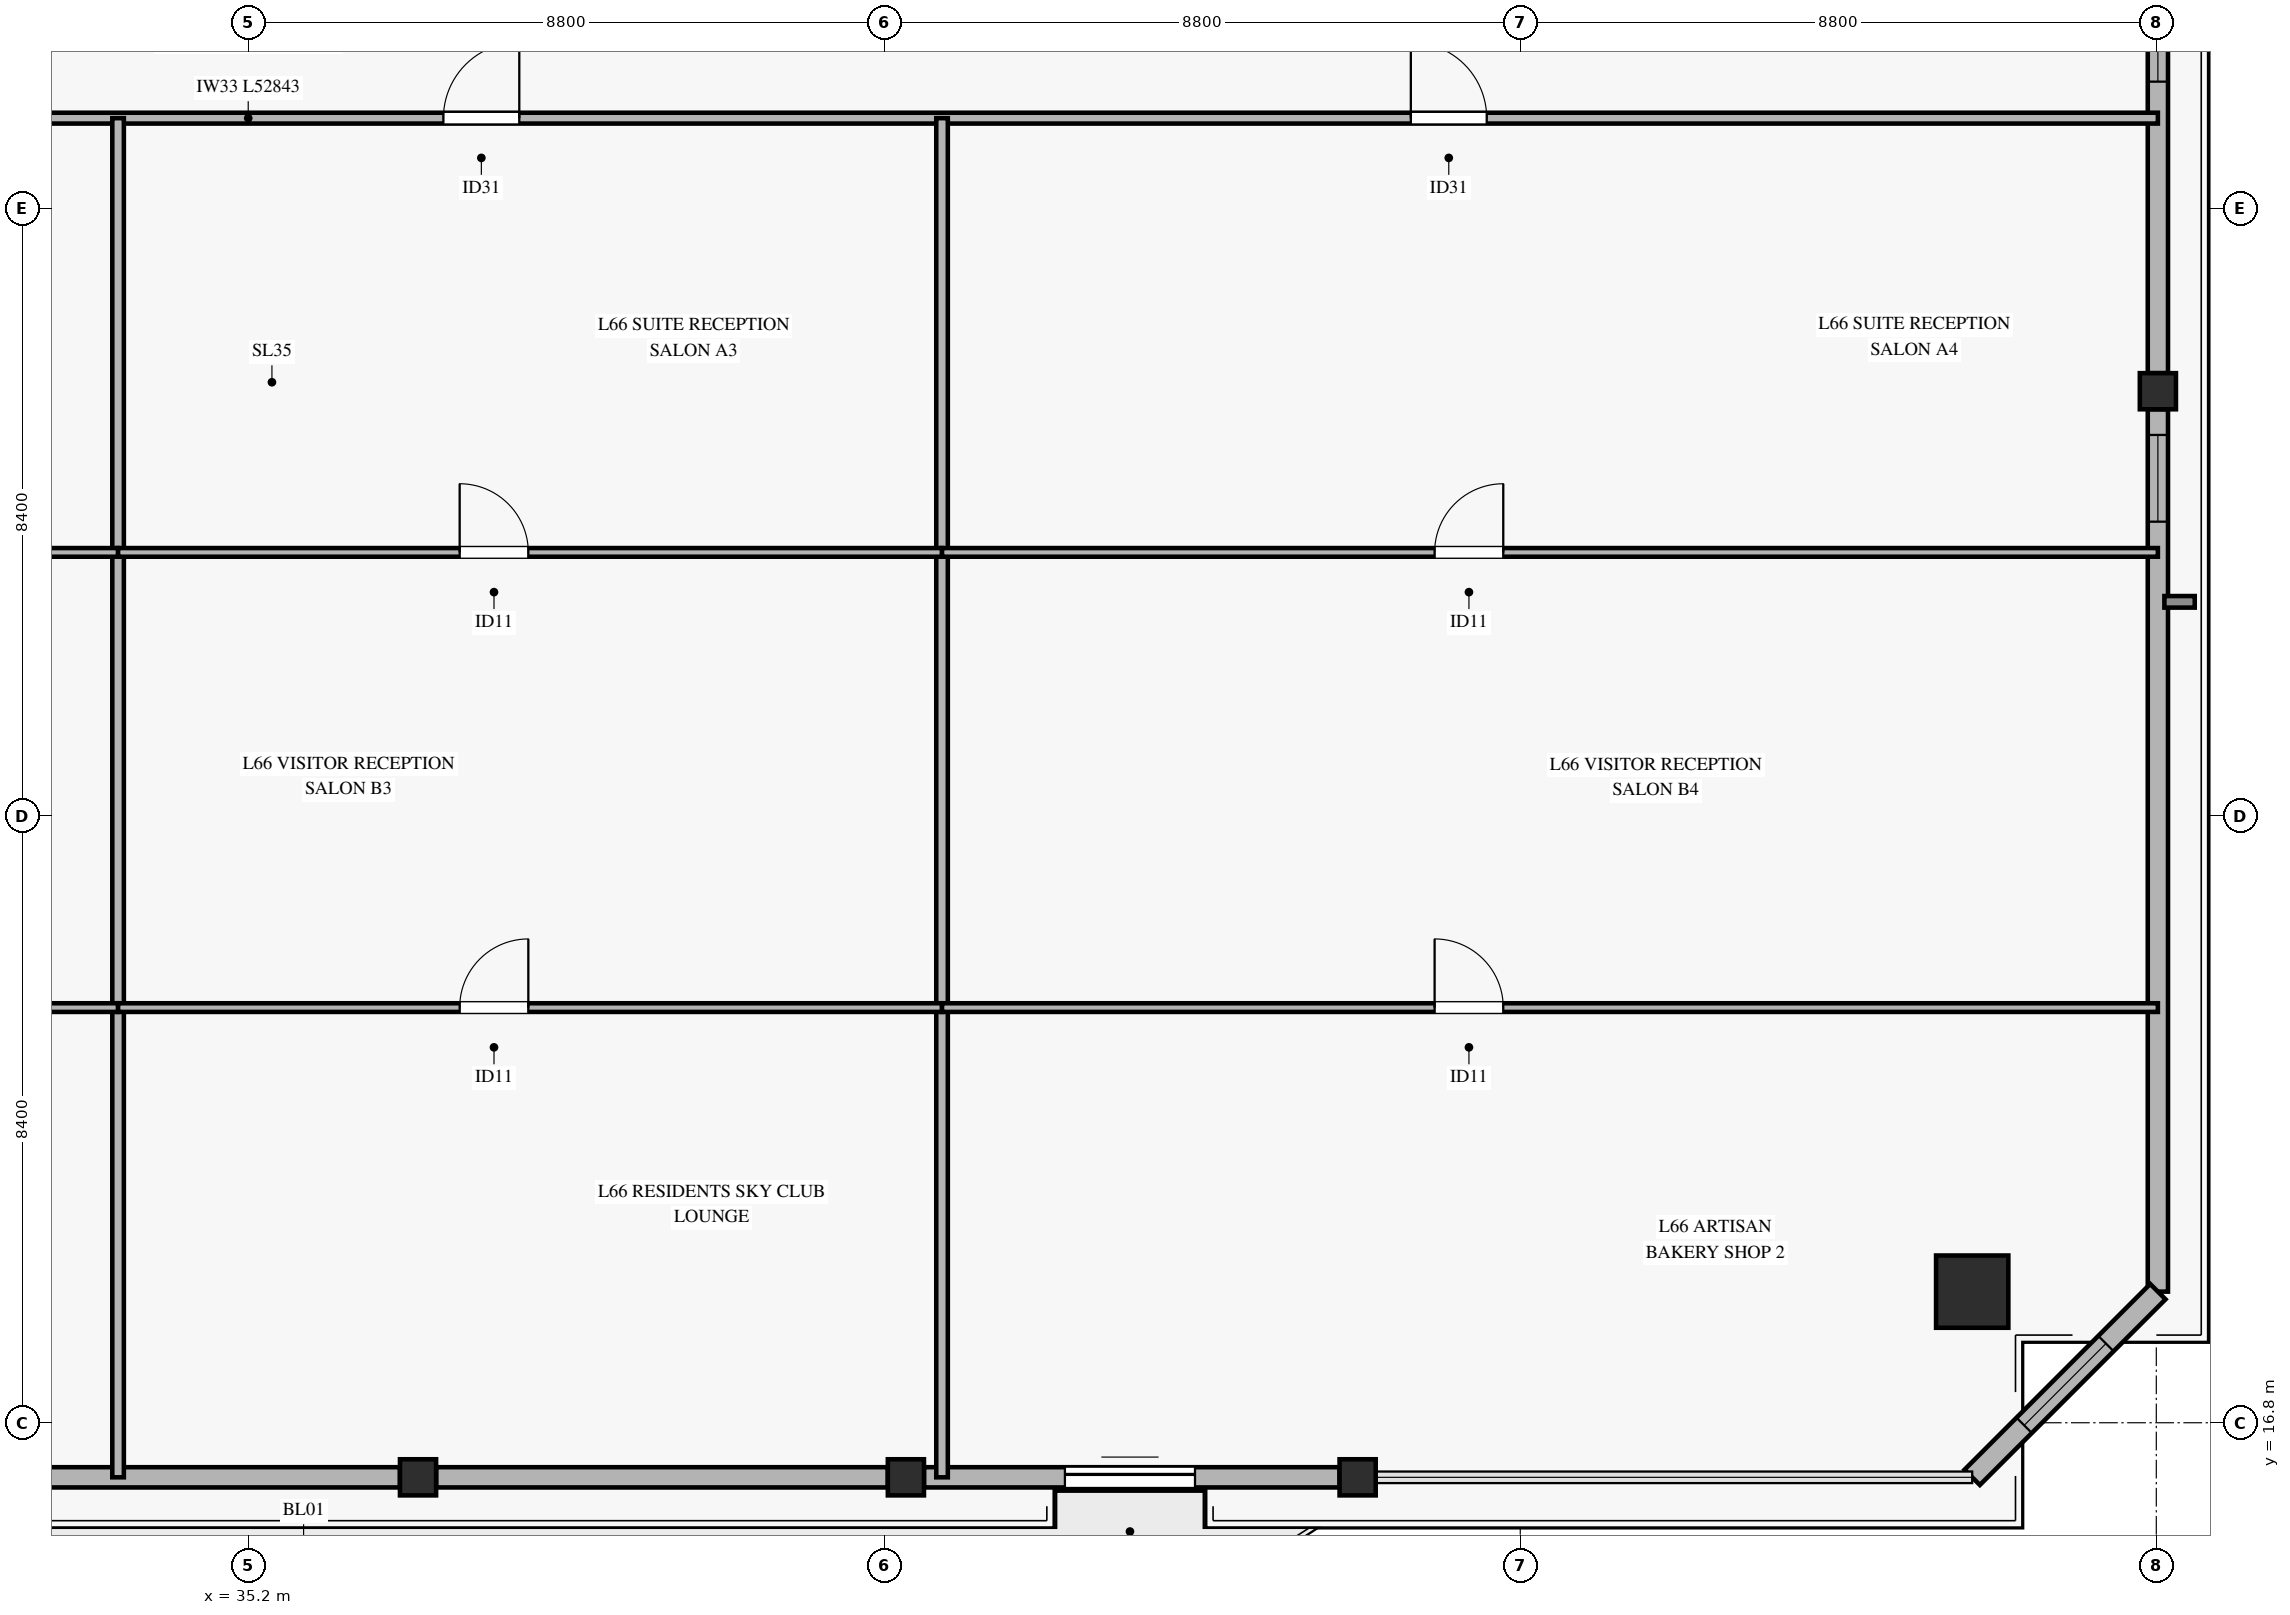
"""IFC4 building model, lengths in metres.
Left out: names, types, materials, properties, quantities, classifications, styles, units other than length and angle.
Written with IfcOpenShell. Run it as: python <this file> out.ifc"""

import sys

from ifc_helpers import new_model, si_unit, direction, frame, frame_2d, origin, origin_2d, place, context, subcontext, project, spatial, rectangle, hollow_rectangle, extrude, source, transform, mapped, element, fill, save


model = new_model("IFC4")
c1 = context("Model", 3, precision=1e-05, world=origin(), true_north=direction((0.0, 1.0)))
c2 = subcontext(c1, "Body", "Model", "MODEL_VIEW")
j1 = project(units=[si_unit("LENGTHUNIT", "METRE"), si_unit("PLANEANGLEUNIT", "RADIAN")], contexts=[c1])
p1 = place(None, origin())
s1 = spatial("IfcSite", under=j1, at=p1, CompositionType="ELEMENT")
p2 = place(p1, origin())
s2 = spatial("IfcBuilding", under=s1, at=p2, CompositionType="ELEMENT")
p3 = place(p2, frame((0.0, 0.0, 258.7)))
s3 = spatial("IfcBuildingStorey", under=s2, at=p3, CompositionType="ELEMENT", Elevation=258.7)
m1 = source(origin(), c2, "Body", "SweptSolid", [
    extrude(hollow_rectangle(XDim=1.0, YDim=1.0, WallThickness=0.045, at=origin_2d()), origin(), (0.0, 0.0, 1.0), 3.185),
])
p4 = place(p3, frame((59.053, 18.614, 0.0), z_axis=(0.0, 0.0, 1.0), x_axis=(1.0, 0.0, 0.0)))
e1 = element("IfcColumn", 1, at=p4, inside=s3, PredefinedType="COLUMN", context=c2, shape_type="MappedRepresentation", body=[
    mapped(m1, transform((0.0, 0.0, 0.0), x_axis=(1.0, 0.0, 0.0), y_axis=(0.0, 1.0, 0.0), z_axis=(0.0, 0.0, 1.0), scale=1.0)),
])
m2 = source(origin(), c2, "Body", "SweptSolid", [
    extrude(hollow_rectangle(XDim=0.5, YDim=0.5, WallThickness=0.024, at=origin_2d()), origin(), (0.0, 0.0, 1.0), 3.185),
])
for number, where, z_axis, x_axis in (
    (2, (37.55, 16.045, 0.0), (0.0, 0.0, 1.0), (1.0, 0.0, 0.0)),
    (3, (44.3, 16.045, 0.0), (0.0, 0.0, 1.0), (1.0, 0.0, 0.0)),
    (4, (50.55, 16.045, 0.0), (0.0, 0.0, 1.0), (1.0, 0.0, 0.0)),
    (5, (61.622, 31.072, 0.0), (0.0, 0.0, 1.0), (1.0, 0.0, 0.0)),
):
    element("IfcColumn", number, at=place(p3, frame(where, z_axis=z_axis, x_axis=x_axis)), inside=s3, PredefinedType="COLUMN", context=c2, shape_type="MappedRepresentation", body=[
        mapped(m2, transform((0.0, 0.0, 0.0), x_axis=(1.0, 0.0, 0.0), y_axis=(0.0, 1.0, 0.0), z_axis=(0.0, 0.0, 1.0), scale=1.0)),
    ])
for number, where, z_axis, x_axis in (
    (6, (31.05, 16.045, 0.0), (0.0, 0.0, 1.0), (1.0, 0.0, 0.0)),
    (7, (37.8, 16.045, 0.0), (0.0, 0.0, 1.0), (1.0, 0.0, 0.0)),
):
    element("IfcWall", number, at=place(p3, frame(where, z_axis=z_axis, x_axis=x_axis)), inside=s3, PredefinedType="SOLIDWALL", context=c2, shape_type="SweptSolid", body=[
        extrude(rectangle(XDim=6.25, YDim=0.28, at=frame_2d((3.125, 0.0))), origin(), (0.0, 0.0, 1.0), 2.815),
    ])
p5 = place(p3, frame((44.55, 16.045, 0.0), z_axis=(0.0, 0.0, 1.0), x_axis=(1.0, 0.0, 0.0)))
e8 = element("IfcWall", 8, at=p5, inside=s3, PredefinedType="SOLIDWALL", context=c2, shape_type="SweptSolid", body=[
    extrude(rectangle(XDim=5.75, YDim=0.28, at=frame_2d((2.875, 0.0))), origin(), (0.0, 0.0, 1.0), 2.815),
])
p6 = place(p5, frame((1.95, 0.0, 0.0)))
e9 = element("IfcOpeningElement", 9, at=p6, cuts=e8, PredefinedType="OPENING", context=c2, shape_type="SweptSolid", body=[
    extrude(rectangle(XDim=1.8, YDim=2.25, at=frame_2d((0.9, 1.125))), frame((0.0, 0.15, 0.0), z_axis=(0.0, -1.0, 0.0), x_axis=(1.0, 0.0, 0.0)), (0.0, 0.0, 1.0), 0.3),
])
p7 = place(p3, frame((61.622, 18.614, 0.0), z_axis=(0.0, 0.0, 1.0), x_axis=(0.0, 1.0, 0.0)))
e10 = element("IfcWall", 10, at=p7, inside=s3, PredefinedType="SOLIDWALL", context=c2, shape_type="SweptSolid", body=[
    extrude(rectangle(XDim=12.208, YDim=0.28, at=frame_2d((6.104, 0.0))), origin(), (0.0, 0.0, 1.0), 2.815),
])
p8 = place(p7, frame((10.653, 0.0, 0.45)))
e11 = element("IfcOpeningElement", 11, at=p8, cuts=e10, PredefinedType="OPENING", context=c2, shape_type="SweptSolid", body=[
    extrude(rectangle(XDim=1.2, YDim=2.0, at=frame_2d((0.6, 1.0))), frame((0.0, 0.15, 0.0), z_axis=(0.0, -1.0, 0.0), x_axis=(1.0, 0.0, 0.0)), (0.0, 0.0, 1.0), 0.3),
])
p9 = place(p3, frame((61.622, 31.322, 0.0), z_axis=(0.0, 0.0, 1.0), x_axis=(0.0, 1.0, 0.0)))
e12 = element("IfcWall", 12, at=p9, inside=s3, PredefinedType="SOLIDWALL", context=c2, shape_type="SweptSolid", body=[
    extrude(rectangle(XDim=12.208, YDim=0.28, at=frame_2d((6.104, 0.0))), origin(), (0.0, 0.0, 1.0), 2.815),
])
p10 = place(p9, frame((4.033, 0.0, 0.45)))
e13 = element("IfcOpeningElement", 13, at=p10, cuts=e12, PredefinedType="OPENING", context=c2, shape_type="SweptSolid", body=[
    extrude(rectangle(XDim=1.6, YDim=2.0, at=frame_2d((0.8, 1.0))), frame((0.0, 0.15, 0.0), z_axis=(0.0, -1.0, 0.0), x_axis=(1.0, 0.0, 0.0)), (0.0, 0.0, 1.0), 0.3),
])
p11 = place(p3, frame((59.053, 16.045, 0.0), z_axis=(0.0, 0.0, 1.0), x_axis=(0.707106781187, 0.707106781187, 0.0)))
e14 = element("IfcWall", 14, at=p11, inside=s3, PredefinedType="SOLIDWALL", context=c2, shape_type="SweptSolid", body=[
    extrude(rectangle(XDim=3.633, YDim=0.3, at=frame_2d((1.817, 0.0))), origin(), (0.0, 0.0, 1.0), 2.815),
])
p12 = place(p11, frame((1.017, 0.0, 0.45)))
e15 = element("IfcOpeningElement", 15, at=p12, cuts=e14, PredefinedType="OPENING", context=c2, shape_type="SweptSolid", body=[
    extrude(rectangle(XDim=1.6, YDim=2.0, at=frame_2d((0.8, 1.0))), frame((0.0, 0.16, 0.0), z_axis=(0.0, -1.0, 0.0), x_axis=(1.0, 0.0, 0.0)), (0.0, 0.0, 1.0), 0.32),
])
p13 = place(p3, frame((8.779, 34.85, 0.0), z_axis=(0.0, 0.0, 1.0), x_axis=(1.0, 0.0, 0.0)))
e16 = element("IfcWall", 16, at=p13, inside=s3, PredefinedType="PARTITIONING", context=c2, shape_type="SweptSolid", body=[
    extrude(rectangle(XDim=52.843, YDim=0.15, at=frame_2d((26.421, 0.0))), origin(), (0.0, 0.0, 1.0), 2.47),
])
p14 = place(p13, frame((4.937, 0.0, 0.0)))
e17 = element("IfcOpeningElement", 17, at=p14, cuts=e16, PredefinedType="OPENING", context=c2, shape_type="SweptSolid", body=[
    extrude(rectangle(XDim=1.05, YDim=2.15, at=frame_2d((0.525, 1.075))), frame((0.0, 0.085, 0.0), z_axis=(0.0, -1.0, 0.0), x_axis=(1.0, 0.0, 0.0)), (0.0, 0.0, 1.0), 0.17),
])
p15 = place(p13, frame((17.102, 0.0, 0.0)))
e18 = element("IfcOpeningElement", 18, at=p15, cuts=e16, PredefinedType="OPENING", context=c2, shape_type="SweptSolid", body=[
    extrude(rectangle(XDim=1.05, YDim=2.15, at=frame_2d((0.525, 1.075))), frame((0.0, 0.085, 0.0), z_axis=(0.0, -1.0, 0.0), x_axis=(1.0, 0.0, 0.0)), (0.0, 0.0, 1.0), 0.17),
])
p16 = place(p13, frame((29.122, 0.0, 0.0)))
e19 = element("IfcOpeningElement", 19, at=p16, cuts=e16, PredefinedType="OPENING", context=c2, shape_type="SweptSolid", body=[
    extrude(rectangle(XDim=1.05, YDim=2.15, at=frame_2d((0.525, 1.075))), frame((0.0, 0.085, 0.0), z_axis=(0.0, -1.0, 0.0), x_axis=(1.0, 0.0, 0.0)), (0.0, 0.0, 1.0), 0.17),
])
p17 = place(p13, frame((42.507, 0.0, 0.0)))
e20 = element("IfcOpeningElement", 20, at=p17, cuts=e16, PredefinedType="OPENING", context=c2, shape_type="SweptSolid", body=[
    extrude(rectangle(XDim=1.05, YDim=2.15, at=frame_2d((0.525, 1.075))), frame((0.0, 0.085, 0.0), z_axis=(0.0, -1.0, 0.0), x_axis=(1.0, 0.0, 0.0)), (0.0, 0.0, 1.0), 0.17),
])
for number, where, z_axis, x_axis in (
    (21, (33.4, 16.045, 0.0), (0.0, 0.0, 1.0), (0.0, 1.0, 0.0)),
    (22, (44.8, 16.045, 0.0), (0.0, 0.0, 1.0), (0.0, 1.0, 0.0)),
):
    element("IfcWall", number, at=place(p3, frame(where, z_axis=z_axis, x_axis=x_axis)), inside=s3, PredefinedType="PARTITIONING", context=c2, shape_type="SweptSolid", body=[
        extrude(rectangle(XDim=18.805, YDim=0.16, at=frame_2d((9.403, 0.0))), origin(), (0.0, 0.0, 1.0), 2.77),
    ])
p18 = place(p3, frame((21.0, 22.544, 0.0), z_axis=(0.0, 0.0, 1.0), x_axis=(1.0, 0.0, 0.0)))
e23 = element("IfcWall", 23, at=p18, inside=s3, PredefinedType="PARTITIONING", context=c2, shape_type="SweptSolid", body=[
    extrude(rectangle(XDim=12.4, YDim=0.12, at=frame_2d((6.2, 0.0))), origin(), (0.0, 0.0, 1.0), 2.47),
])
p19 = place(p18, frame((5.126, 0.0, 0.0)))
e24 = element("IfcOpeningElement", 24, at=p19, cuts=e23, PredefinedType="OPENING", context=c2, shape_type="SweptSolid", body=[
    extrude(rectangle(XDim=0.95, YDim=2.1, at=frame_2d((0.475, 1.05))), frame((0.0, 0.07, 0.0), z_axis=(0.0, -1.0, 0.0), x_axis=(1.0, 0.0, 0.0)), (0.0, 0.0, 1.0), 0.14),
])
p20 = place(p3, frame((21.0, 28.842, 0.0), z_axis=(0.0, 0.0, 1.0), x_axis=(1.0, 0.0, 0.0)))
e25 = element("IfcWall", 25, at=p20, inside=s3, PredefinedType="PARTITIONING", context=c2, shape_type="SweptSolid", body=[
    extrude(rectangle(XDim=12.4, YDim=0.12, at=frame_2d((6.2, 0.0))), origin(), (0.0, 0.0, 1.0), 2.47),
])
p21 = place(p20, frame((5.126, 0.0, 0.0)))
e26 = element("IfcOpeningElement", 26, at=p21, cuts=e25, PredefinedType="OPENING", context=c2, shape_type="SweptSolid", body=[
    extrude(rectangle(XDim=0.95, YDim=2.1, at=frame_2d((0.475, 1.05))), frame((0.0, 0.07, 0.0), z_axis=(0.0, -1.0, 0.0), x_axis=(1.0, 0.0, 0.0)), (0.0, 0.0, 1.0), 0.14),
])
p22 = place(p3, frame((33.4, 22.544, 0.0), z_axis=(0.0, 0.0, 1.0), x_axis=(1.0, 0.0, 0.0)))
e27 = element("IfcWall", 27, at=p22, inside=s3, PredefinedType="PARTITIONING", context=c2, shape_type="SweptSolid", body=[
    extrude(rectangle(XDim=11.4, YDim=0.12, at=frame_2d((5.7, 0.0))), origin(), (0.0, 0.0, 1.0), 2.47),
])
p23 = place(p22, frame((4.726, 0.0, 0.0)))
e28 = element("IfcOpeningElement", 28, at=p23, cuts=e27, PredefinedType="OPENING", context=c2, shape_type="SweptSolid", body=[
    extrude(rectangle(XDim=0.95, YDim=2.1, at=frame_2d((0.475, 1.05))), frame((0.0, 0.07, 0.0), z_axis=(0.0, -1.0, 0.0), x_axis=(1.0, 0.0, 0.0)), (0.0, 0.0, 1.0), 0.14),
])
p24 = place(p3, frame((33.4, 28.842, 0.0), z_axis=(0.0, 0.0, 1.0), x_axis=(1.0, 0.0, 0.0)))
e29 = element("IfcWall", 29, at=p24, inside=s3, PredefinedType="PARTITIONING", context=c2, shape_type="SweptSolid", body=[
    extrude(rectangle(XDim=11.4, YDim=0.12, at=frame_2d((5.7, 0.0))), origin(), (0.0, 0.0, 1.0), 2.47),
])
p25 = place(p24, frame((4.726, 0.0, 0.0)))
e30 = element("IfcOpeningElement", 30, at=p25, cuts=e29, PredefinedType="OPENING", context=c2, shape_type="SweptSolid", body=[
    extrude(rectangle(XDim=0.95, YDim=2.1, at=frame_2d((0.475, 1.05))), frame((0.0, 0.07, 0.0), z_axis=(0.0, -1.0, 0.0), x_axis=(1.0, 0.0, 0.0)), (0.0, 0.0, 1.0), 0.14),
])
p26 = place(p3, frame((44.8, 22.544, 0.0), z_axis=(0.0, 0.0, 1.0), x_axis=(1.0, 0.0, 0.0)))
e31 = element("IfcWall", 31, at=p26, inside=s3, PredefinedType="PARTITIONING", context=c2, shape_type="SweptSolid", body=[
    extrude(rectangle(XDim=16.822, YDim=0.12, at=frame_2d((8.411, 0.0))), origin(), (0.0, 0.0, 1.0), 2.47),
])
p27 = place(p26, frame((6.815, 0.0, 0.0)))
e32 = element("IfcOpeningElement", 32, at=p27, cuts=e31, PredefinedType="OPENING", context=c2, shape_type="SweptSolid", body=[
    extrude(rectangle(XDim=0.95, YDim=2.1, at=frame_2d((0.475, 1.05))), frame((0.0, 0.07, 0.0), z_axis=(0.0, -1.0, 0.0), x_axis=(1.0, 0.0, 0.0)), (0.0, 0.0, 1.0), 0.14),
])
p28 = place(p3, frame((44.8, 28.842, 0.0), z_axis=(0.0, 0.0, 1.0), x_axis=(1.0, 0.0, 0.0)))
e33 = element("IfcWall", 33, at=p28, inside=s3, PredefinedType="PARTITIONING", context=c2, shape_type="SweptSolid", body=[
    extrude(rectangle(XDim=16.822, YDim=0.12, at=frame_2d((8.411, 0.0))), origin(), (0.0, 0.0, 1.0), 2.47),
])
p29 = place(p28, frame((6.815, 0.0, 0.0)))
e34 = element("IfcOpeningElement", 34, at=p29, cuts=e33, PredefinedType="OPENING", context=c2, shape_type="SweptSolid", body=[
    extrude(rectangle(XDim=0.95, YDim=2.1, at=frame_2d((0.475, 1.05))), frame((0.0, 0.07, 0.0), z_axis=(0.0, -1.0, 0.0), x_axis=(1.0, 0.0, 0.0)), (0.0, 0.0, 1.0), 0.14),
])
m3 = source(origin(), c2, "Body", "SweptSolid", [
    extrude(rectangle(XDim=1.8, YDim=2.25, at=frame_2d((0.9, 1.125))), frame((0.0, 0.025, 0.0), z_axis=(0.0, -1.0, 0.0), x_axis=(1.0, 0.0, 0.0)), (0.0, 0.0, 1.0), 0.05),
])
p30 = place(p6, origin())
e35 = element("IfcDoor", 35, at=p30, inside=s3, OperationType="SLIDING_TO_LEFT", PredefinedType="DOOR", context=c2, shape_type="MappedRepresentation", body=[
    mapped(m3, transform((0.0, 0.0, 0.0), x_axis=(1.0, 0.0, 0.0), y_axis=(0.0, 1.0, 0.0), z_axis=(0.0, 0.0, 1.0), scale=1.0)),
])
fill(e9, e35)
m4 = source(origin(), c2, "Body", "SweptSolid", [
    extrude(rectangle(XDim=1.2, YDim=2.0, at=frame_2d((0.6, 1.0))), frame((0.0, 0.03, 0.0), z_axis=(0.0, -1.0, 0.0), x_axis=(1.0, 0.0, 0.0)), (0.0, 0.0, 1.0), 0.06),
])
p31 = place(p8, origin())
e36 = element("IfcWindow", 36, at=p31, inside=s3, PartitioningType="SINGLE_PANEL", PredefinedType="WINDOW", context=c2, shape_type="MappedRepresentation", body=[
    mapped(m4, transform((0.0, 0.0, 0.0), x_axis=(1.0, 0.0, 0.0), y_axis=(0.0, 1.0, 0.0), z_axis=(0.0, 0.0, 1.0), scale=1.0)),
])
fill(e11, e36)
m5 = source(origin(), c2, "Body", "SweptSolid", [
    extrude(rectangle(XDim=1.6, YDim=2.0, at=frame_2d((0.8, 1.0))), frame((0.0, 0.03, 0.0), z_axis=(0.0, -1.0, 0.0), x_axis=(1.0, 0.0, 0.0)), (0.0, 0.0, 1.0), 0.06),
])
p32 = place(p10, origin())
e37 = element("IfcWindow", 37, at=p32, inside=s3, PartitioningType="SINGLE_PANEL", PredefinedType="WINDOW", context=c2, shape_type="MappedRepresentation", body=[
    mapped(m5, transform((0.0, 0.0, 0.0), x_axis=(1.0, 0.0, 0.0), y_axis=(0.0, 1.0, 0.0), z_axis=(0.0, 0.0, 1.0), scale=1.0)),
])
fill(e13, e37)
p33 = place(p12, origin())
e38 = element("IfcWindow", 38, at=p33, inside=s3, PartitioningType="SINGLE_PANEL", PredefinedType="WINDOW", context=c2, shape_type="MappedRepresentation", body=[
    mapped(m5, transform((0.0, 0.0, 0.0), x_axis=(1.0, 0.0, 0.0), y_axis=(0.0, 1.0, 0.0), z_axis=(0.0, 0.0, 1.0), scale=1.0)),
])
fill(e15, e38)
m6 = source(origin(), c2, "Body", "SweptSolid", [
    extrude(rectangle(XDim=1.05, YDim=2.15, at=frame_2d((0.525, 1.075))), frame((0.0, 0.025, 0.0), z_axis=(0.0, -1.0, 0.0), x_axis=(1.0, 0.0, 0.0)), (0.0, 0.0, 1.0), 0.05),
])
p34 = place(p16, origin())
e39 = element("IfcDoor", 39, at=p34, inside=s3, OperationType="SINGLE_SWING_RIGHT", PredefinedType="DOOR", context=c2, shape_type="MappedRepresentation", body=[
    mapped(m6, transform((0.0, 0.0, 0.0), x_axis=(1.0, 0.0, 0.0), y_axis=(0.0, 1.0, 0.0), z_axis=(0.0, 0.0, 1.0), scale=1.0)),
])
fill(e19, e39)
m7 = source(origin(), c2, "Body", "SweptSolid", [
    extrude(rectangle(XDim=0.95, YDim=2.1, at=frame_2d((0.475, 1.05))), frame((0.0, 0.025, 0.0), z_axis=(0.0, -1.0, 0.0), x_axis=(1.0, 0.0, 0.0)), (0.0, 0.0, 1.0), 0.05),
])
p35 = place(p25, origin())
e40 = element("IfcDoor", 40, at=p35, inside=s3, OperationType="SINGLE_SWING_LEFT", PredefinedType="DOOR", context=c2, shape_type="MappedRepresentation", body=[
    mapped(m7, transform((0.0, 0.0, 0.0), x_axis=(1.0, 0.0, 0.0), y_axis=(0.0, 1.0, 0.0), z_axis=(0.0, 0.0, 1.0), scale=1.0)),
])
fill(e30, e40)
p36 = place(p23, origin())
e41 = element("IfcDoor", 41, at=p36, inside=s3, OperationType="SINGLE_SWING_RIGHT", PredefinedType="DOOR", context=c2, shape_type="MappedRepresentation", body=[
    mapped(m7, transform((0.0, 0.0, 0.0), x_axis=(1.0, 0.0, 0.0), y_axis=(0.0, 1.0, 0.0), z_axis=(0.0, 0.0, 1.0), scale=1.0)),
])
fill(e28, e41)
p37 = place(p17, origin())
e42 = element("IfcDoor", 42, at=p37, inside=s3, OperationType="SINGLE_SWING_LEFT", PredefinedType="DOOR", context=c2, shape_type="MappedRepresentation", body=[
    mapped(m6, transform((0.0, 0.0, 0.0), x_axis=(1.0, 0.0, 0.0), y_axis=(0.0, 1.0, 0.0), z_axis=(0.0, 0.0, 1.0), scale=1.0)),
])
fill(e20, e42)
p38 = place(p29, origin())
e43 = element("IfcDoor", 43, at=p38, inside=s3, OperationType="SINGLE_SWING_RIGHT", PredefinedType="DOOR", context=c2, shape_type="MappedRepresentation", body=[
    mapped(m7, transform((0.0, 0.0, 0.0), x_axis=(1.0, 0.0, 0.0), y_axis=(0.0, 1.0, 0.0), z_axis=(0.0, 0.0, 1.0), scale=1.0)),
])
fill(e34, e43)
p39 = place(p27, origin())
e44 = element("IfcDoor", 44, at=p39, inside=s3, OperationType="SINGLE_SWING_LEFT", PredefinedType="DOOR", context=c2, shape_type="MappedRepresentation", body=[
    mapped(m7, transform((0.0, 0.0, 0.0), x_axis=(1.0, 0.0, 0.0), y_axis=(0.0, 1.0, 0.0), z_axis=(0.0, 0.0, 1.0), scale=1.0)),
])
fill(e32, e44)
save(model, sys.argv[1])
